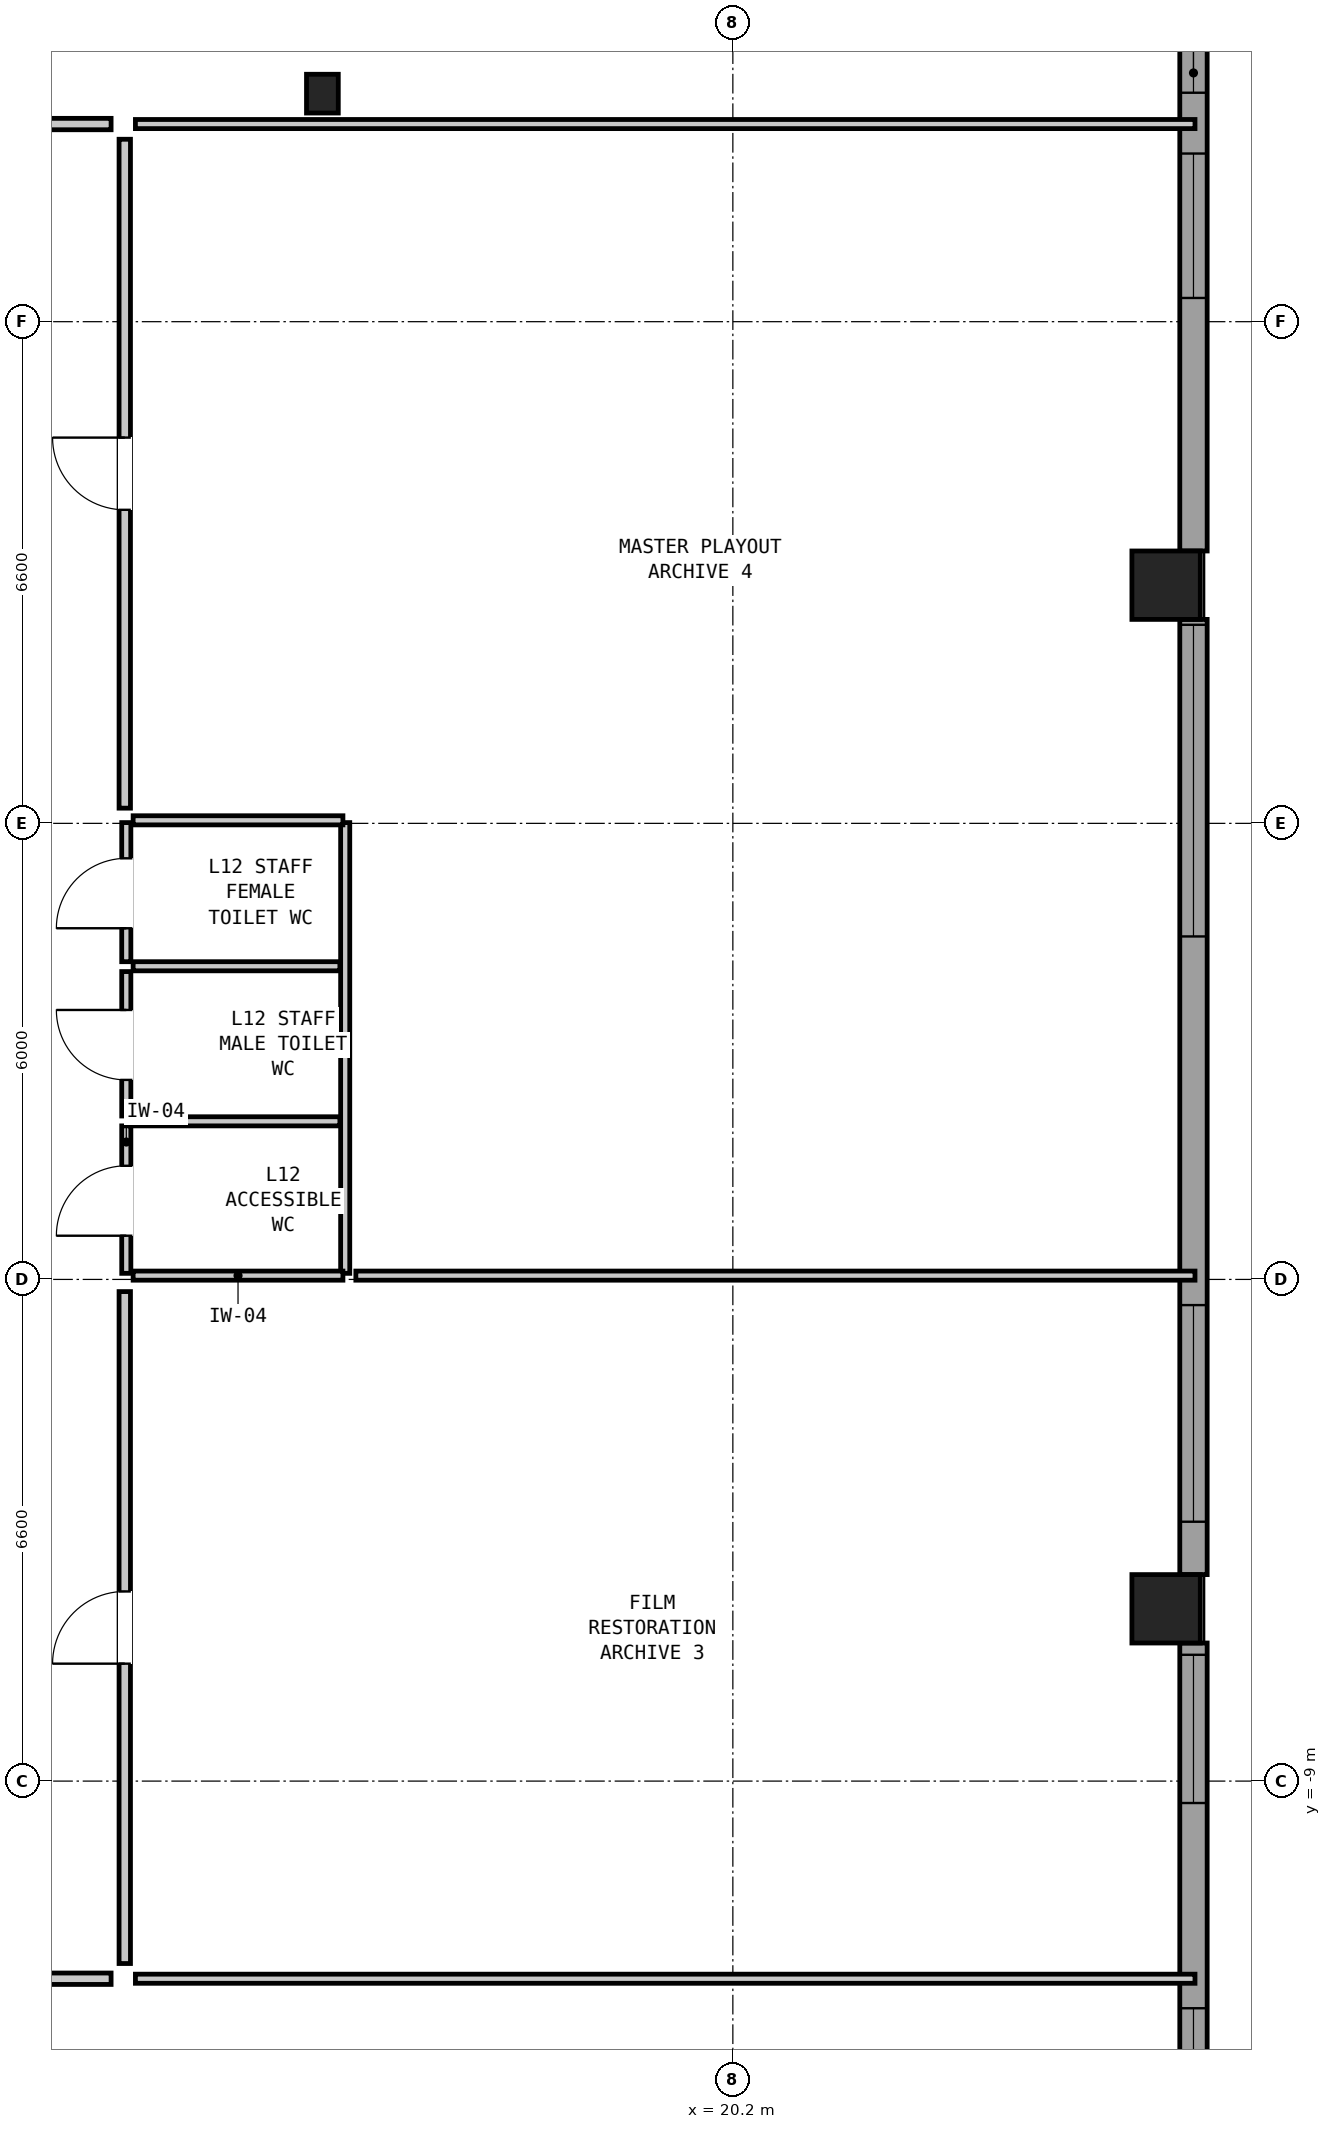
"""IFC4 building model, lengths in metres.
Left out: names, types, materials, properties, quantities, classifications, styles, units other than length and angle.
Written with IfcOpenShell. Run it as: python <this file> out.ifc"""

import sys

from ifc_helpers import new_model, si_unit, direction, frame, frame_2d, origin, origin_2d, place, context, subcontext, project, spatial, rectangle, hollow_rectangle, i_section, extrude, element, fill, save


model = new_model("IFC4")
c1 = context("Model", 3, precision=1e-05, world=origin(), true_north=direction((0.0, 1.0)))
c2 = subcontext(c1, "Body", "Model", "MODEL_VIEW")
j1 = project(units=[si_unit("LENGTHUNIT", "METRE"), si_unit("PLANEANGLEUNIT", "RADIAN")], contexts=[c1])
p1 = place(None, origin())
s1 = spatial("IfcSite", under=j1, at=p1, CompositionType="ELEMENT")
p2 = place(p1, origin())
s2 = spatial("IfcBuilding", under=s1, at=p2, CompositionType="ELEMENT")
p3 = place(p2, frame((0.0, 0.0, 44.4)))
s3 = spatial("IfcBuildingStorey", under=s2, at=p3, CompositionType="ELEMENT", Elevation=44.4)
for number, where, z_axis, x_axis in (
    (1, (25.9, -6.733, 0.0), (0.0, 0.0, 1.0), (0.0, 1.0, 0.0)),
    (2, (25.9, 6.733, 0.0), (0.0, 0.0, 1.0), (0.0, 1.0, 0.0)),
):
    element("IfcColumn", number, at=place(p3, frame(where, z_axis=z_axis, x_axis=x_axis)), inside=s3, PredefinedType="COLUMN", context=c2, shape_type="SweptSolid", body=[
        extrude(hollow_rectangle(XDim=0.9, YDim=0.9, WallThickness=0.055, at=origin_2d()), origin(), (0.0, 0.0, 1.0), 3.05),
    ])
p4 = place(p3, frame((14.8, 13.2, 0.0), z_axis=(0.0, 0.0, 1.0), x_axis=(1.0, 0.0, 0.0)))
e3 = element("IfcColumn", 3, at=p4, inside=s3, PredefinedType="COLUMN", context=c2, shape_type="SweptSolid", body=[
    extrude(i_section(OverallWidth=0.418, OverallDepth=0.51, WebThickness=0.042, FlangeThickness=0.068, at=origin_2d()), origin(), (0.0, 0.0, 1.0), 3.05),
])
p5 = place(p3, frame((26.26, 19.762, 0.0), z_axis=(0.0, 0.0, 1.0), x_axis=(0.0, -1.0, 0.0)))
e4 = element("IfcWall", 4, at=p5, inside=s3, PredefinedType="SOLIDWALL", context=c2, shape_type="SweptSolid", body=[
    extrude(rectangle(XDim=12.579, YDim=0.36, at=frame_2d((6.289, 0.0))), origin(), (0.0, 0.0, 1.0), 2.067),
])
p6 = place(p5, frame((2.15, 0.0, 1.2)))
e5 = element("IfcOpeningElement", 5, at=p6, cuts=e4, PredefinedType="OPENING", context=c2, shape_type="SweptSolid", body=[
    extrude(rectangle(XDim=1.95, YDim=0.7, at=frame_2d((0.975, 0.35))), frame((0.0, 0.192, 0.0), z_axis=(0.0, -1.0, 0.0), x_axis=(1.0, 0.0, 0.0)), (0.0, 0.0, 1.0), 0.384),
])
p7 = place(p5, frame((5.05, 0.0, 0.2)))
e6 = element("IfcOpeningElement", 6, at=p7, cuts=e4, PredefinedType="OPENING", context=c2, shape_type="SweptSolid", body=[
    extrude(rectangle(XDim=1.5, YDim=0.95, at=frame_2d((0.75, 0.475))), frame((0.0, 0.192, 0.0), z_axis=(0.0, -1.0, 0.0), x_axis=(1.0, 0.0, 0.0)), (0.0, 0.0, 1.0), 0.384),
])
p8 = place(p5, frame((7.35, 0.0, 0.2)))
e7 = element("IfcOpeningElement", 7, at=p8, cuts=e4, PredefinedType="OPENING", context=c2, shape_type="SweptSolid", body=[
    extrude(rectangle(XDim=1.9, YDim=1.1, at=frame_2d((0.95, 0.55))), frame((0.0, 0.192, 0.0), z_axis=(0.0, -1.0, 0.0), x_axis=(1.0, 0.0, 0.0)), (0.0, 0.0, 1.0), 0.384),
])
p9 = place(p3, frame((26.26, 6.283, 0.0), z_axis=(0.0, 0.0, 1.0), x_axis=(0.0, -1.0, 0.0)))
e8 = element("IfcWall", 8, at=p9, inside=s3, PredefinedType="SOLIDWALL", context=c2, shape_type="SweptSolid", body=[
    extrude(rectangle(XDim=12.566, YDim=0.36, at=frame_2d((6.283, 0.0))), origin(), (0.0, 0.0, 1.0), 2.067),
])
p10 = place(p9, frame((0.071, 0.0, 0.2)))
e9 = element("IfcOpeningElement", 9, at=p10, cuts=e8, PredefinedType="OPENING", context=c2, shape_type="SweptSolid", body=[
    extrude(rectangle(XDim=4.1, YDim=1.05, at=frame_2d((2.05, 0.525))), frame((0.0, 0.192, 0.0), z_axis=(0.0, -1.0, 0.0), x_axis=(1.0, 0.0, 0.0)), (0.0, 0.0, 1.0), 0.384),
])
p11 = place(p9, frame((9.021, 0.0, 0.2)))
e10 = element("IfcOpeningElement", 10, at=p11, cuts=e8, PredefinedType="OPENING", context=c2, shape_type="SweptSolid", body=[
    extrude(rectangle(XDim=2.85, YDim=1.4, at=frame_2d((1.425, 0.7))), frame((0.0, 0.192, 0.0), z_axis=(0.0, -1.0, 0.0), x_axis=(1.0, 0.0, 0.0)), (0.0, 0.0, 1.0), 0.384),
])
p12 = place(p3, frame((26.26, -7.183, 0.0), z_axis=(0.0, 0.0, 1.0), x_axis=(0.0, -1.0, 0.0)))
e11 = element("IfcWall", 11, at=p12, inside=s3, PredefinedType="SOLIDWALL", context=c2, shape_type="SweptSolid", body=[
    extrude(rectangle(XDim=12.579, YDim=0.36, at=frame_2d((6.289, 0.0))), origin(), (0.0, 0.0, 1.0), 2.067),
])
p13 = place(p12, frame((0.155, 0.0, 1.2)))
e12 = element("IfcOpeningElement", 12, at=p13, cuts=e11, PredefinedType="OPENING", context=c2, shape_type="SweptSolid", body=[
    extrude(rectangle(XDim=1.95, YDim=0.7, at=frame_2d((0.975, 0.35))), frame((0.0, 0.192, 0.0), z_axis=(0.0, -1.0, 0.0), x_axis=(1.0, 0.0, 0.0)), (0.0, 0.0, 1.0), 0.384),
])
p14 = place(p12, frame((4.805, 0.0, 0.2)))
e13 = element("IfcOpeningElement", 13, at=p14, cuts=e11, PredefinedType="OPENING", context=c2, shape_type="SweptSolid", body=[
    extrude(rectangle(XDim=2.1, YDim=1.3, at=frame_2d((1.05, 0.65))), frame((0.0, 0.192, 0.0), z_axis=(0.0, -1.0, 0.0), x_axis=(1.0, 0.0, 0.0)), (0.0, 0.0, 1.0), 0.384),
])
p15 = place(p3, frame((12.22, -2.32, 0.0), z_axis=(0.0, 0.0, 1.0), x_axis=(0.0, 1.0, 0.0)))
e14 = element("IfcWall", 14, at=p15, inside=s3, PredefinedType="PARTITIONING", context=c2, shape_type="SweptSolid", body=[
    extrude(rectangle(XDim=1.94, YDim=0.12, at=frame_2d((0.97, 0.0))), origin(), (0.0, 0.0, 1.0), 2.83),
])
p16 = place(p15, frame((0.495, 0.0, 0.0)))
e15 = element("IfcOpeningElement", 15, at=p16, cuts=e14, PredefinedType="OPENING", context=c2, shape_type="SweptSolid", body=[
    extrude(rectangle(XDim=0.92, YDim=2.1, at=frame_2d((0.46, 1.05))), frame((0.0, 0.072, 0.0), z_axis=(0.0, -1.0, 0.0), x_axis=(1.0, 0.0, 0.0)), (0.0, 0.0, 1.0), 0.144),
])
p17 = place(p3, frame((12.22, -0.25, 0.0), z_axis=(0.0, 0.0, 1.0), x_axis=(0.0, 1.0, 0.0)))
e16 = element("IfcWall", 16, at=p17, inside=s3, PredefinedType="PARTITIONING", context=c2, shape_type="SweptSolid", body=[
    extrude(rectangle(XDim=1.9, YDim=0.12, at=frame_2d((0.95, 0.0))), origin(), (0.0, 0.0, 1.0), 2.83),
])
p18 = place(p17, frame((0.475, 0.0, 0.0)))
e17 = element("IfcOpeningElement", 17, at=p18, cuts=e16, PredefinedType="OPENING", context=c2, shape_type="SweptSolid", body=[
    extrude(rectangle(XDim=0.92, YDim=2.1, at=frame_2d((0.46, 1.05))), frame((0.0, 0.072, 0.0), z_axis=(0.0, -1.0, 0.0), x_axis=(1.0, 0.0, 0.0)), (0.0, 0.0, 1.0), 0.144),
])
p19 = place(p3, frame((12.22, 1.78, 0.0), z_axis=(0.0, 0.0, 1.0), x_axis=(0.0, 1.0, 0.0)))
e18 = element("IfcWall", 18, at=p19, inside=s3, PredefinedType="PARTITIONING", context=c2, shape_type="SweptSolid", body=[
    extrude(rectangle(XDim=1.83, YDim=0.12, at=frame_2d((0.915, 0.0))), origin(), (0.0, 0.0, 1.0), 2.83),
])
p20 = place(p19, frame((0.44, 0.0, 0.0)))
e19 = element("IfcOpeningElement", 19, at=p20, cuts=e18, PredefinedType="OPENING", context=c2, shape_type="SweptSolid", body=[
    extrude(rectangle(XDim=0.92, YDim=2.1, at=frame_2d((0.46, 1.05))), frame((0.0, 0.072, 0.0), z_axis=(0.0, -1.0, 0.0), x_axis=(1.0, 0.0, 0.0)), (0.0, 0.0, 1.0), 0.144),
])
p21 = place(p3, frame((15.1, -2.32, 0.0), z_axis=(0.0, 0.0, 1.0), x_axis=(0.0, 1.0, 0.0)))
e20 = element("IfcWall", 20, at=p21, inside=s3, PredefinedType="PARTITIONING", context=c2, shape_type="SweptSolid", body=[
    extrude(rectangle(XDim=5.93, YDim=0.12, at=frame_2d((2.965, 0.0))), origin(), (0.0, 0.0, 1.0), 2.83),
])
for number, where, z_axis, x_axis in (
    (21, (12.31, -2.35, 0.0), (0.0, 0.0, 1.0), (1.0, 0.0, 0.0)),
    (22, (12.31, 3.64, 0.0), (0.0, 0.0, 1.0), (1.0, 0.0, 0.0)),
):
    element("IfcWall", number, at=place(p3, frame(where, z_axis=z_axis, x_axis=x_axis)), inside=s3, PredefinedType="PARTITIONING", context=c2, shape_type="SweptSolid", body=[
        extrude(rectangle(XDim=2.76, YDim=0.12, at=frame_2d((1.38, 0.0))), origin(), (0.0, 0.0, 1.0), 1.799),
    ])
for number, where, z_axis, x_axis in (
    (23, (12.31, -0.32, 0.0), (0.0, 0.0, 1.0), (1.0, 0.0, 0.0)),
    (24, (12.31, 1.72, 0.0), (0.0, 0.0, 1.0), (1.0, 0.0, 0.0)),
):
    element("IfcWall", number, at=place(p3, frame(where, z_axis=z_axis, x_axis=x_axis)), inside=s3, PredefinedType="PARTITIONING", context=c2, shape_type="SweptSolid", body=[
        extrude(rectangle(XDim=2.72, YDim=0.12, at=frame_2d((1.36, 0.0))), origin(), (0.0, 0.0, 1.0), 2.83),
    ])
p22 = place(p3, frame((12.34, 12.8, 0.0), z_axis=(0.0, 0.0, 1.0), x_axis=(1.0, 0.0, 0.0)))
e25 = element("IfcWall", 25, at=p22, inside=s3, PredefinedType="PARTITIONING", context=c2, shape_type="SweptSolid", body=[
    extrude(rectangle(XDim=13.94, YDim=0.12, at=frame_2d((6.97, 0.0))), origin(), (0.0, 0.0, 1.0), 2.83),
])
p23 = place(p3, frame((12.34, -11.6, 0.0), z_axis=(0.0, 0.0, 1.0), x_axis=(1.0, 0.0, 0.0)))
e26 = element("IfcWall", 26, at=p23, inside=s3, PredefinedType="PARTITIONING", context=c2, shape_type="SweptSolid", body=[
    extrude(rectangle(XDim=13.94, YDim=0.12, at=frame_2d((6.97, 0.0))), origin(), (0.0, 0.0, 1.0), 2.274),
])
p24 = place(p3, frame((15.24, -2.35, 0.0), z_axis=(0.0, 0.0, 1.0), x_axis=(1.0, 0.0, 0.0)))
e27 = element("IfcWall", 27, at=p24, inside=s3, PredefinedType="PARTITIONING", context=c2, shape_type="SweptSolid", body=[
    extrude(rectangle(XDim=11.04, YDim=0.12, at=frame_2d((5.52, 0.0))), origin(), (0.0, 0.0, 1.0), 1.799),
])
p25 = place(p3, frame((6.68, 12.8, 0.0), z_axis=(0.0, 0.0, 1.0), x_axis=(1.0, 0.0, 0.0)))
e28 = element("IfcWall", 28, at=p25, inside=s3, PredefinedType="PARTITIONING", context=c2, shape_type="SweptSolid", body=[
    extrude(rectangle(XDim=5.34, YDim=0.15, at=frame_2d((2.67, 0.0))), origin(), (0.0, 0.0, 1.0), 2.83),
])
p26 = place(p25, frame((1.395, 0.0, 0.0)))
e29 = element("IfcOpeningElement", 29, at=p26, cuts=e28, PredefinedType="OPENING", context=c2, shape_type="SweptSolid", body=[
    extrude(rectangle(XDim=0.95, YDim=2.1, at=frame_2d((0.475, 1.05))), frame((0.0, 0.087, 0.0), z_axis=(0.0, -1.0, 0.0), x_axis=(1.0, 0.0, 0.0)), (0.0, 0.0, 1.0), 0.174),
])
p27 = place(p3, frame((7.68, -11.6, 0.0), z_axis=(0.0, 0.0, 1.0), x_axis=(1.0, 0.0, 0.0)))
e30 = element("IfcWall", 30, at=p27, inside=s3, PredefinedType="PARTITIONING", context=c2, shape_type="SweptSolid", body=[
    extrude(rectangle(XDim=4.34, YDim=0.15, at=frame_2d((2.17, 0.0))), origin(), (0.0, 0.0, 1.0), 2.274),
])
p28 = place(p27, frame((2.095, 0.0, 0.0)))
e31 = element("IfcOpeningElement", 31, at=p28, cuts=e30, PredefinedType="OPENING", context=c2, shape_type="SweptSolid", body=[
    extrude(rectangle(XDim=0.95, YDim=2.1, at=frame_2d((0.475, 1.05))), frame((0.0, 0.087, 0.0), z_axis=(0.0, -1.0, 0.0), x_axis=(1.0, 0.0, 0.0)), (0.0, 0.0, 1.0), 0.174),
])
p29 = place(p3, frame((12.2, -11.4, 0.0), z_axis=(0.0, 0.0, 1.0), x_axis=(0.0, 1.0, 0.0)))
e32 = element("IfcWall", 32, at=p29, inside=s3, PredefinedType="PARTITIONING", context=c2, shape_type="SweptSolid", body=[
    extrude(rectangle(XDim=8.84, YDim=0.15, at=frame_2d((4.42, 0.0))), origin(), (0.0, 0.0, 1.0), 2.83),
])
p30 = place(p29, frame((3.945, 0.0, 0.0)))
e33 = element("IfcOpeningElement", 33, at=p30, cuts=e32, PredefinedType="OPENING", context=c2, shape_type="SweptSolid", body=[
    extrude(rectangle(XDim=0.95, YDim=2.1, at=frame_2d((0.475, 1.05))), frame((0.0, 0.087, 0.0), z_axis=(0.0, -1.0, 0.0), x_axis=(1.0, 0.0, 0.0)), (0.0, 0.0, 1.0), 0.174),
])
p31 = place(p3, frame((12.2, 3.8, 0.0), z_axis=(0.0, 0.0, 1.0), x_axis=(0.0, 1.0, 0.0)))
e34 = element("IfcWall", 34, at=p31, inside=s3, PredefinedType="PARTITIONING", context=c2, shape_type="SweptSolid", body=[
    extrude(rectangle(XDim=8.8, YDim=0.15, at=frame_2d((4.4, 0.0))), origin(), (0.0, 0.0, 1.0), 2.83),
])
p32 = place(p31, frame((3.925, 0.0, 0.0)))
e35 = element("IfcOpeningElement", 35, at=p32, cuts=e34, PredefinedType="OPENING", context=c2, shape_type="SweptSolid", body=[
    extrude(rectangle(XDim=0.95, YDim=2.1, at=frame_2d((0.475, 1.05))), frame((0.0, 0.087, 0.0), z_axis=(0.0, -1.0, 0.0), x_axis=(1.0, 0.0, 0.0)), (0.0, 0.0, 1.0), 0.174),
])
p33 = place(p7, origin())
e36 = element("IfcWindow", 36, at=p33, inside=s3, PartitioningType="SINGLE_PANEL", PredefinedType="WINDOW", context=c2, shape_type="SweptSolid", body=[
    extrude(rectangle(XDim=1.5, YDim=0.95, at=frame_2d((0.75, 0.475))), frame((0.0, 0.03, 0.0), z_axis=(0.0, -1.0, 0.0), x_axis=(1.0, 0.0, 0.0)), (0.0, 0.0, 1.0), 0.06),
])
fill(e6, e36)
p34 = place(p8, origin())
e37 = element("IfcWindow", 37, at=p34, inside=s3, PartitioningType="SINGLE_PANEL", PredefinedType="WINDOW", context=c2, shape_type="SweptSolid", body=[
    extrude(rectangle(XDim=1.9, YDim=1.1, at=frame_2d((0.95, 0.55))), frame((0.0, 0.03, 0.0), z_axis=(0.0, -1.0, 0.0), x_axis=(1.0, 0.0, 0.0)), (0.0, 0.0, 1.0), 0.06),
])
fill(e7, e37)
p35 = place(p10, origin())
e38 = element("IfcWindow", 38, at=p35, inside=s3, PartitioningType="SINGLE_PANEL", PredefinedType="WINDOW", context=c2, shape_type="SweptSolid", body=[
    extrude(rectangle(XDim=4.1, YDim=1.05, at=frame_2d((2.05, 0.525))), frame((0.0, 0.03, 0.0), z_axis=(0.0, -1.0, 0.0), x_axis=(1.0, 0.0, 0.0)), (0.0, 0.0, 1.0), 0.06),
])
fill(e9, e38)
p36 = place(p11, origin())
e39 = element("IfcWindow", 39, at=p36, inside=s3, PartitioningType="SINGLE_PANEL", PredefinedType="WINDOW", context=c2, shape_type="SweptSolid", body=[
    extrude(rectangle(XDim=2.85, YDim=1.4, at=frame_2d((1.425, 0.7))), frame((0.0, 0.03, 0.0), z_axis=(0.0, -1.0, 0.0), x_axis=(1.0, 0.0, 0.0)), (0.0, 0.0, 1.0), 0.06),
])
fill(e10, e39)
p37 = place(p13, origin())
e40 = element("IfcWindow", 40, at=p37, inside=s3, PartitioningType="SINGLE_PANEL", PredefinedType="WINDOW", context=c2, shape_type="SweptSolid", body=[
    extrude(rectangle(XDim=1.95, YDim=0.7, at=frame_2d((0.975, 0.35))), frame((0.0, 0.03, 0.0), z_axis=(0.0, -1.0, 0.0), x_axis=(1.0, 0.0, 0.0)), (0.0, 0.0, 1.0), 0.06),
])
fill(e12, e40)
p38 = place(p14, origin())
e41 = element("IfcWindow", 41, at=p38, inside=s3, PartitioningType="SINGLE_PANEL", PredefinedType="WINDOW", context=c2, shape_type="SweptSolid", body=[
    extrude(rectangle(XDim=2.1, YDim=1.3, at=frame_2d((1.05, 0.65))), frame((0.0, 0.03, 0.0), z_axis=(0.0, -1.0, 0.0), x_axis=(1.0, 0.0, 0.0)), (0.0, 0.0, 1.0), 0.06),
])
fill(e13, e41)
p39 = place(p16, origin())
e42 = element("IfcDoor", 42, at=p39, inside=s3, OperationType="SINGLE_SWING_LEFT", PredefinedType="DOOR", context=c2, shape_type="SweptSolid", body=[
    extrude(rectangle(XDim=0.92, YDim=2.1, at=frame_2d((0.46, 1.05))), frame((0.0, 0.025, 0.0), z_axis=(0.0, -1.0, 0.0), x_axis=(1.0, 0.0, 0.0)), (0.0, 0.0, 1.0), 0.05),
])
fill(e15, e42)
p40 = place(p18, origin())
e43 = element("IfcDoor", 43, at=p40, inside=s3, OperationType="SINGLE_SWING_RIGHT", PredefinedType="DOOR", context=c2, shape_type="SweptSolid", body=[
    extrude(rectangle(XDim=0.92, YDim=2.1, at=frame_2d((0.46, 1.05))), frame((0.0, 0.025, 0.0), z_axis=(0.0, -1.0, 0.0), x_axis=(1.0, 0.0, 0.0)), (0.0, 0.0, 1.0), 0.05),
])
fill(e17, e43)
p41 = place(p20, origin())
e44 = element("IfcDoor", 44, at=p41, inside=s3, OperationType="SINGLE_SWING_LEFT", PredefinedType="DOOR", context=c2, shape_type="SweptSolid", body=[
    extrude(rectangle(XDim=0.92, YDim=2.1, at=frame_2d((0.46, 1.05))), frame((0.0, 0.025, 0.0), z_axis=(0.0, -1.0, 0.0), x_axis=(1.0, 0.0, 0.0)), (0.0, 0.0, 1.0), 0.05),
])
fill(e19, e44)
p42 = place(p30, origin())
e45 = element("IfcDoor", 45, at=p42, inside=s3, OperationType="SINGLE_SWING_LEFT", PredefinedType="DOOR", context=c2, shape_type="SweptSolid", body=[
    extrude(rectangle(XDim=0.95, YDim=2.1, at=frame_2d((0.475, 1.05))), frame((0.0, 0.025, 0.0), z_axis=(0.0, -1.0, 0.0), x_axis=(1.0, 0.0, 0.0)), (0.0, 0.0, 1.0), 0.05),
])
fill(e33, e45)
p43 = place(p32, origin())
e46 = element("IfcDoor", 46, at=p43, inside=s3, OperationType="SINGLE_SWING_RIGHT", PredefinedType="DOOR", context=c2, shape_type="SweptSolid", body=[
    extrude(rectangle(XDim=0.95, YDim=2.1, at=frame_2d((0.475, 1.05))), frame((0.0, 0.025, 0.0), z_axis=(0.0, -1.0, 0.0), x_axis=(1.0, 0.0, 0.0)), (0.0, 0.0, 1.0), 0.05),
])
fill(e35, e46)
save(model, sys.argv[1])
